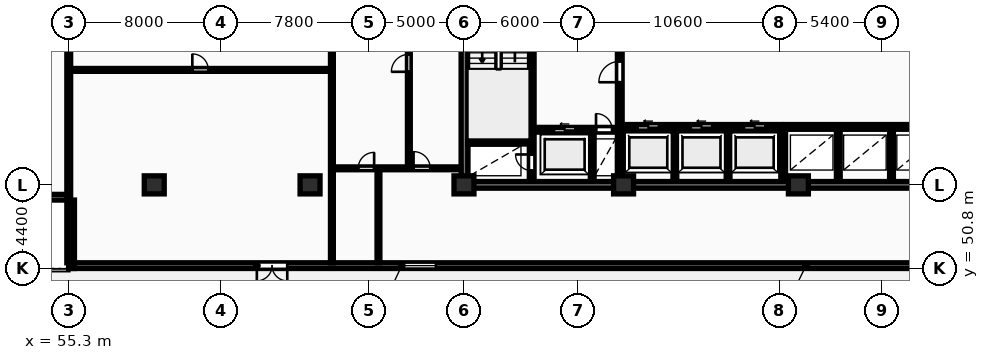
"""IFC4 building model, lengths in metres.
Left out: names, types, materials, properties, quantities, classifications, styles, units other than length and angle.
Written with IfcOpenShell. Run it as: python <this file> out.ifc"""

import sys

from ifc_helpers import new_model, si_unit, direction, frame, frame_2d, origin, origin_2d, place, context, subcontext, project, spatial, rectangle, extrude, element, fill, save


model = new_model("IFC4")
c1 = context("Model", 3, precision=1e-05, world=origin(), true_north=direction((0.0, 1.0)))
c2 = subcontext(c1, "Body", "Model", "MODEL_VIEW")
j1 = project(units=[si_unit("LENGTHUNIT", "METRE"), si_unit("PLANEANGLEUNIT", "RADIAN")], contexts=[c1])
p1 = place(None, origin())
s1 = spatial("IfcSite", under=j1, at=p1, CompositionType="ELEMENT")
p2 = place(p1, origin())
s2 = spatial("IfcBuilding", under=s1, at=p2, CompositionType="ELEMENT")
p3 = place(p2, frame((0.0, 0.0, 24.0)))
s3 = spatial("IfcBuildingStorey", under=s2, at=p3, CompositionType="ELEMENT", Elevation=24.0)
for number, where, z_axis, x_axis in (
    (1, (59.8, 55.2, 0.0), (0.0, 0.0, 1.0), (1.0, 0.0, 0.0)),
    (2, (68.0, 55.2, 0.0), (0.0, 0.0, 1.0), (1.0, 0.0, 0.0)),
    (3, (76.1, 55.2, 0.0), (0.0, 0.0, 1.0), (1.0, 0.0, 0.0)),
    (4, (84.5, 55.2, 0.0), (0.0, 0.0, 1.0), (1.0, 0.0, 0.0)),
    (5, (93.7, 55.2, 0.0), (0.0, 0.0, 1.0), (1.0, 0.0, 0.0)),
):
    element("IfcColumn", number, at=place(p3, frame(where, z_axis=z_axis, x_axis=x_axis)), inside=s3, PredefinedType="COLUMN", context=c2, shape_type="SweptSolid", body=[
        extrude(rectangle(XDim=1.05, YDim=0.95, at=origin_2d()), origin(), (0.0, 0.0, 1.0), 3.25),
    ])
p4 = place(p3, frame((55.3, 50.95, 0.0), z_axis=(0.0, 0.0, 1.0), x_axis=(1.0, 0.0, 0.0)))
e6 = element("IfcWall", 6, at=p4, inside=s3, PredefinedType="STANDARD", context=c2, shape_type="SweptSolid", body=[
    extrude(rectangle(XDim=77.6, YDim=0.3, at=frame_2d((38.8, 0.0))), origin(), (0.0, 0.0, 1.0), 2.97),
])
p5 = place(p4, frame((17.525, 0.0, 0.85)))
e7 = element("IfcOpeningElement", 7, at=p5, cuts=e6, PredefinedType="OPENING", context=c2, shape_type="SweptSolid", body=[
    extrude(rectangle(XDim=1.8, YDim=1.8, at=frame_2d((0.9, 0.9))), frame((0.0, 0.16, 0.0), z_axis=(0.0, -1.0, 0.0), x_axis=(1.0, 0.0, 0.0)), (0.0, 0.0, 1.0), 0.32),
])
p6 = place(p4, frame((60.875, 0.0, 0.85)))
e8 = element("IfcOpeningElement", 8, at=p6, cuts=e6, PredefinedType="OPENING", context=c2, shape_type="SweptSolid", body=[
    extrude(rectangle(XDim=1.8, YDim=1.8, at=frame_2d((0.9, 0.9))), frame((0.0, 0.16, 0.0), z_axis=(0.0, -1.0, 0.0), x_axis=(1.0, 0.0, 0.0)), (0.0, 0.0, 1.0), 0.32),
])
p7 = place(p4, frame((9.9, 0.0, 0.0)))
e9 = element("IfcOpeningElement", 9, at=p7, cuts=e6, PredefinedType="OPENING", context=c2, shape_type="SweptSolid", body=[
    extrude(rectangle(XDim=1.6, YDim=2.2, at=frame_2d((0.8, 1.1))), frame((0.0, 0.16, 0.0), z_axis=(0.0, -1.0, 0.0), x_axis=(1.0, 0.0, 0.0)), (0.0, 0.0, 1.0), 0.32),
])
p8 = place(p3, frame((51.7, 54.55, 0.0), z_axis=(0.0, 0.0, 1.0), x_axis=(1.0, 0.0, 0.0)))
e10 = element("IfcWall", 10, at=p8, inside=s3, PredefinedType="STANDARD", context=c2, shape_type="SweptSolid", body=[
    extrude(rectangle(XDim=3.6, YDim=0.3, at=frame_2d((1.8, 0.0))), origin(), (0.0, 0.0, 1.0), 2.97),
])
p9 = place(p3, frame((55.45, 54.4, 0.0), z_axis=(0.0, 0.0, 1.0), x_axis=(0.0, -1.0, 0.0)))
e11 = element("IfcWall", 11, at=p9, inside=s3, PredefinedType="STANDARD", context=c2, shape_type="SweptSolid", body=[
    extrude(rectangle(XDim=3.6, YDim=0.3, at=frame_2d((1.8, 0.0))), origin(), (0.0, 0.0, 1.0), 2.97),
])
p10 = place(p3, frame((75.95, 55.2, 0.0), z_axis=(0.0, 0.0, 1.0), x_axis=(1.0, 0.0, 0.0)))
e12 = element("IfcWall", 12, at=p10, inside=s3, PredefinedType="SHEAR", context=c2, shape_type="SweptSolid", body=[
    extrude(rectangle(XDim=36.3, YDim=0.35, at=frame_2d((18.15, 0.0))), origin(), (0.0, 0.0, 1.0), 3.25),
])
p11 = place(p3, frame((76.125, 55.375, 0.0), z_axis=(0.0, 0.0, 1.0), x_axis=(0.0, 1.0, 0.0)))
e13 = element("IfcWall", 13, at=p11, inside=s3, PredefinedType="SHEAR", context=c2, shape_type="SweptSolid", body=[
    extrude(rectangle(XDim=11.65, YDim=0.35, at=frame_2d((5.825, 0.0))), origin(), (0.0, 0.0, 1.0), 3.25),
])
p12 = place(p3, frame((79.665, 55.4, 0.0), z_axis=(0.0, 0.0, 1.0), x_axis=(0.0, 1.0, 0.0)))
e14 = element("IfcWall", 14, at=p12, inside=s3, PredefinedType="SHEAR", context=c2, shape_type="SweptSolid", body=[
    extrude(rectangle(XDim=11.6, YDim=0.25, at=frame_2d((5.8, 0.0))), origin(), (0.0, 0.0, 1.0), 3.25),
])
p13 = place(p12, frame((0.55, 0.0, 0.0)))
e15 = element("IfcOpeningElement", 15, at=p13, cuts=e14, PredefinedType="OPENING", context=c2, shape_type="SweptSolid", body=[
    extrude(rectangle(XDim=0.85, YDim=2.05, at=frame_2d((0.425, 1.025))), frame((0.0, 0.135, 0.0), z_axis=(0.0, -1.0, 0.0), x_axis=(1.0, 0.0, 0.0)), (0.0, 0.0, 1.0), 0.27),
])
p14 = place(p12, frame((8.4, 0.0, 0.0)))
e16 = element("IfcOpeningElement", 16, at=p14, cuts=e14, PredefinedType="OPENING", context=c2, shape_type="SweptSolid", body=[
    extrude(rectangle(XDim=1.1, YDim=2.1, at=frame_2d((0.55, 1.05))), frame((0.0, 0.135, 0.0), z_axis=(0.0, -1.0, 0.0), x_axis=(1.0, 0.0, 0.0)), (0.0, 0.0, 1.0), 0.27),
])
p15 = place(p12, frame((10.25, 0.0, 0.0)))
e17 = element("IfcOpeningElement", 17, at=p15, cuts=e14, PredefinedType="OPENING", context=c2, shape_type="SweptSolid", body=[
    extrude(rectangle(XDim=0.85, YDim=2.05, at=frame_2d((0.425, 1.025))), frame((0.0, 0.135, 0.0), z_axis=(0.0, -1.0, 0.0), x_axis=(1.0, 0.0, 0.0)), (0.0, 0.0, 1.0), 0.27),
])
p16 = place(p3, frame((76.3, 57.475, 0.0), z_axis=(0.0, 0.0, 1.0), x_axis=(1.0, 0.0, 0.0)))
e18 = element("IfcWall", 18, at=p16, inside=s3, PredefinedType="SHEAR", context=c2, shape_type="SweptSolid", body=[
    extrude(rectangle(XDim=3.24, YDim=0.25, at=frame_2d((1.62, 0.0))), origin(), (0.0, 0.0, 1.0), 3.25),
])
p17 = place(p3, frame((79.79, 58.1, 0.0), z_axis=(0.0, 0.0, 1.0), x_axis=(1.0, 0.0, 0.0)))
e19 = element("IfcWall", 19, at=p17, inside=s3, PredefinedType="SHEAR", context=c2, shape_type="SweptSolid", body=[
    extrude(rectangle(XDim=4.39, YDim=0.25, at=frame_2d((2.195, 0.0))), origin(), (0.0, 0.0, 1.0), 3.25),
])
p18 = place(p17, frame((1.05, 0.0, 0.0)))
e20 = element("IfcOpeningElement", 20, at=p18, cuts=e19, PredefinedType="OPENING", context=c2, shape_type="SweptSolid", body=[
    extrude(rectangle(XDim=1.12, YDim=2.12, at=frame_2d((0.56, 1.06))), frame((0.0, 0.135, 0.0), z_axis=(0.0, -1.0, 0.0), x_axis=(1.0, 0.0, 0.0)), (0.0, 0.0, 1.0), 0.27),
])
p19 = place(p17, frame((3.26, 0.0, 0.0)))
e21 = element("IfcOpeningElement", 21, at=p19, cuts=e19, PredefinedType="OPENING", context=c2, shape_type="SweptSolid", body=[
    extrude(rectangle(XDim=0.85, YDim=2.05, at=frame_2d((0.425, 1.025))), frame((0.0, 0.135, 0.0), z_axis=(0.0, -1.0, 0.0), x_axis=(1.0, 0.0, 0.0)), (0.0, 0.0, 1.0), 0.27),
])
p20 = place(p3, frame((82.85, 55.4, 0.0), z_axis=(0.0, 0.0, 1.0), x_axis=(0.0, 1.0, 0.0)))
e22 = element("IfcWall", 22, at=p20, inside=s3, PredefinedType="PARTITIONING", context=c2, shape_type="SweptSolid", body=[
    extrude(rectangle(XDim=2.56, YDim=0.2, at=frame_2d((1.28, 0.0))), origin(), (0.0, 0.0, 1.0), 2.97),
])
p21 = place(p3, frame((84.3, 55.4, 0.0), z_axis=(0.0, 0.0, 1.0), x_axis=(0.0, 1.0, 0.0)))
e23 = element("IfcWall", 23, at=p21, inside=s3, PredefinedType="SHEAR", context=c2, shape_type="SweptSolid", body=[
    extrude(rectangle(XDim=11.6, YDim=0.25, at=frame_2d((5.8, 0.0))), origin(), (0.0, 0.0, 1.0), 3.25),
])
p22 = place(p21, frame((5.2, 0.0, 0.0)))
e24 = element("IfcOpeningElement", 24, at=p22, cuts=e23, PredefinedType="OPENING", context=c2, shape_type="SweptSolid", body=[
    extrude(rectangle(XDim=1.1, YDim=2.1, at=frame_2d((0.55, 1.05))), frame((0.0, 0.135, 0.0), z_axis=(0.0, -1.0, 0.0), x_axis=(1.0, 0.0, 0.0)), (0.0, 0.0, 1.0), 0.27),
])
for number, where, z_axis, x_axis in (
    (25, (87.2, 55.4, 0.0), (0.0, 0.0, 1.0), (0.0, 1.0, 0.0)),
    (26, (90.0, 55.4, 0.0), (0.0, 0.0, 1.0), (0.0, 1.0, 0.0)),
):
    element("IfcWall", number, at=place(p3, frame(where, z_axis=z_axis, x_axis=x_axis)), inside=s3, PredefinedType="PARTITIONING", context=c2, shape_type="SweptSolid", body=[
        extrude(rectangle(XDim=2.72, YDim=0.2, at=frame_2d((1.36, 0.0))), origin(), (0.0, 0.0, 1.0), 2.97),
    ])
p23 = place(p3, frame((84.42, 58.25, 0.0), z_axis=(0.0, 0.0, 1.0), x_axis=(1.0, 0.0, 0.0)))
e27 = element("IfcWall", 27, at=p23, inside=s3, PredefinedType="SHEAR", context=c2, shape_type="SweptSolid", body=[
    extrude(rectangle(XDim=8.36, YDim=0.25, at=frame_2d((4.18, 0.0))), origin(), (0.0, 0.0, 1.0), 3.25),
])
p24 = place(p23, frame((0.82, 0.0, 0.0)))
e28 = element("IfcOpeningElement", 28, at=p24, cuts=e27, PredefinedType="OPENING", context=c2, shape_type="SweptSolid", body=[
    extrude(rectangle(XDim=1.12, YDim=2.12, at=frame_2d((0.56, 1.06))), frame((0.0, 0.135, 0.0), z_axis=(0.0, -1.0, 0.0), x_axis=(1.0, 0.0, 0.0)), (0.0, 0.0, 1.0), 0.27),
])
p25 = place(p23, frame((3.62, 0.0, 0.0)))
e29 = element("IfcOpeningElement", 29, at=p25, cuts=e27, PredefinedType="OPENING", context=c2, shape_type="SweptSolid", body=[
    extrude(rectangle(XDim=1.12, YDim=2.12, at=frame_2d((0.56, 1.06))), frame((0.0, 0.135, 0.0), z_axis=(0.0, -1.0, 0.0), x_axis=(1.0, 0.0, 0.0)), (0.0, 0.0, 1.0), 0.27),
])
p26 = place(p23, frame((6.42, 0.0, 0.0)))
e30 = element("IfcOpeningElement", 30, at=p26, cuts=e27, PredefinedType="OPENING", context=c2, shape_type="SweptSolid", body=[
    extrude(rectangle(XDim=1.12, YDim=2.12, at=frame_2d((0.56, 1.06))), frame((0.0, 0.135, 0.0), z_axis=(0.0, -1.0, 0.0), x_axis=(1.0, 0.0, 0.0)), (0.0, 0.0, 1.0), 0.27),
])
p27 = place(p3, frame((92.9, 55.4, 0.0), z_axis=(0.0, 0.0, 1.0), x_axis=(0.0, 1.0, 0.0)))
e31 = element("IfcWall", 31, at=p27, inside=s3, PredefinedType="SHEAR", context=c2, shape_type="SweptSolid", body=[
    extrude(rectangle(XDim=2.85, YDim=0.25, at=frame_2d((1.425, 0.0))), origin(), (0.0, 0.0, 1.0), 3.25),
])
for number, where, z_axis, x_axis in (
    (32, (95.8, 55.4, 0.0), (0.0, 0.0, 1.0), (0.0, 1.0, 0.0)),
    (33, (98.6, 55.4, 0.0), (0.0, 0.0, 1.0), (0.0, 1.0, 0.0)),
):
    element("IfcWall", number, at=place(p3, frame(where, z_axis=z_axis, x_axis=x_axis)), inside=s3, PredefinedType="PARTITIONING", context=c2, shape_type="SweptSolid", body=[
        extrude(rectangle(XDim=2.72, YDim=0.2, at=frame_2d((1.36, 0.0))), origin(), (0.0, 0.0, 1.0), 2.97),
    ])
p28 = place(p3, frame((93.02, 58.25, 0.0), z_axis=(0.0, 0.0, 1.0), x_axis=(1.0, 0.0, 0.0)))
e34 = element("IfcWall", 34, at=p28, inside=s3, PredefinedType="SHEAR", context=c2, shape_type="SweptSolid", body=[
    extrude(rectangle(XDim=8.36, YDim=0.25, at=frame_2d((4.18, 0.0))), origin(), (0.0, 0.0, 1.0), 3.25),
])
p29 = place(p3, frame((55.3, 51.1, 0.0), z_axis=(0.0, 0.0, 1.0), x_axis=(0.0, 1.0, 0.0)))
e35 = element("IfcWall", 35, at=p29, inside=s3, PredefinedType="PARTITIONING", context=c2, shape_type="SweptSolid", body=[
    extrude(rectangle(XDim=16.1, YDim=0.2, at=frame_2d((8.05, 0.0))), origin(), (0.0, 0.0, 1.0), 2.97),
])
p30 = place(p3, frame((55.3, 61.25, 0.0), z_axis=(0.0, 0.0, 1.0), x_axis=(1.0, 0.0, 0.0)))
e36 = element("IfcWall", 36, at=p30, inside=s3, PredefinedType="PARTITIONING", context=c2, shape_type="SweptSolid", body=[
    extrude(rectangle(XDim=13.85, YDim=0.15, at=frame_2d((6.925, 0.0))), origin(), (0.0, 0.0, 1.0), 2.97),
])
p31 = place(p30, frame((6.505, 0.0, 0.0)))
e37 = element("IfcOpeningElement", 37, at=p31, cuts=e36, PredefinedType="OPENING", context=c2, shape_type="SweptSolid", body=[
    extrude(rectangle(XDim=0.84, YDim=2.04, at=frame_2d((0.42, 1.02))), frame((0.0, 0.085, 0.0), z_axis=(0.0, -1.0, 0.0), x_axis=(1.0, 0.0, 0.0)), (0.0, 0.0, 1.0), 0.17),
])
p32 = place(p3, frame((69.15, 51.1, 0.0), z_axis=(0.0, 0.0, 1.0), x_axis=(0.0, 1.0, 0.0)))
e38 = element("IfcWall", 38, at=p32, inside=s3, PredefinedType="PARTITIONING", context=c2, shape_type="SweptSolid", body=[
    extrude(rectangle(XDim=16.05, YDim=0.15, at=frame_2d((8.025, 0.0))), origin(), (0.0, 0.0, 1.0), 2.97),
])
p33 = place(p32, frame((11.3, 0.0, 0.0)))
e39 = element("IfcOpeningElement", 39, at=p33, cuts=e38, PredefinedType="OPENING", context=c2, shape_type="SweptSolid", body=[
    extrude(rectangle(XDim=0.88, YDim=2.06, at=frame_2d((0.44, 1.03))), frame((0.0, 0.085, 0.0), z_axis=(0.0, -1.0, 0.0), x_axis=(1.0, 0.0, 0.0)), (0.0, 0.0, 1.0), 0.17),
])
p34 = place(p3, frame((73.2, 56.07, 0.0), z_axis=(0.0, 0.0, 1.0), x_axis=(0.0, 1.0, 0.0)))
e40 = element("IfcWall", 40, at=p34, inside=s3, PredefinedType="PARTITIONING", context=c2, shape_type="SweptSolid", body=[
    extrude(rectangle(XDim=11.08, YDim=0.15, at=frame_2d((5.54, 0.0))), origin(), (0.0, 0.0, 1.0), 2.97),
])
p35 = place(p34, frame((5.08, 0.0, 0.0)))
e41 = element("IfcOpeningElement", 41, at=p35, cuts=e40, PredefinedType="OPENING", context=c2, shape_type="SweptSolid", body=[
    extrude(rectangle(XDim=0.92, YDim=2.08, at=frame_2d((0.46, 1.04))), frame((0.0, 0.085, 0.0), z_axis=(0.0, -1.0, 0.0), x_axis=(1.0, 0.0, 0.0)), (0.0, 0.0, 1.0), 0.17),
])
p36 = place(p3, frame((71.6, 51.1, 0.0), z_axis=(0.0, 0.0, 1.0), x_axis=(0.0, 1.0, 0.0)))
e42 = element("IfcWall", 42, at=p36, inside=s3, PredefinedType="PARTITIONING", context=c2, shape_type="SweptSolid", body=[
    extrude(rectangle(XDim=4.97, YDim=0.15, at=frame_2d((2.485, 0.0))), origin(), (0.0, 0.0, 1.0), 2.97),
])
p37 = place(p3, frame((69.17, 56.07, 0.0), z_axis=(0.0, 0.0, 1.0), x_axis=(1.0, 0.0, 0.0)))
e43 = element("IfcWall", 43, at=p37, inside=s3, PredefinedType="PARTITIONING", context=c2, shape_type="SweptSolid", body=[
    extrude(rectangle(XDim=6.76, YDim=0.15, at=frame_2d((3.38, 0.0))), origin(), (0.0, 0.0, 1.0), 2.97),
])
p38 = place(p37, frame((1.362, 0.0, 0.0)))
e44 = element("IfcOpeningElement", 44, at=p38, cuts=e43, PredefinedType="OPENING", context=c2, shape_type="SweptSolid", body=[
    extrude(rectangle(XDim=0.84, YDim=2.04, at=frame_2d((0.42, 1.02))), frame((0.0, 0.085, 0.0), z_axis=(0.0, -1.0, 0.0), x_axis=(1.0, 0.0, 0.0)), (0.0, 0.0, 1.0), 0.17),
])
p39 = place(p37, frame((4.277, 0.0, 0.0)))
e45 = element("IfcOpeningElement", 45, at=p39, cuts=e43, PredefinedType="OPENING", context=c2, shape_type="SweptSolid", body=[
    extrude(rectangle(XDim=0.88, YDim=2.06, at=frame_2d((0.44, 1.03))), frame((0.0, 0.085, 0.0), z_axis=(0.0, -1.0, 0.0), x_axis=(1.0, 0.0, 0.0)), (0.0, 0.0, 1.0), 0.17),
])
p40 = place(p5, origin())
e46 = element("IfcWindow", 46, at=p40, inside=s3, PartitioningType="SINGLE_PANEL", PredefinedType="WINDOW", context=c2, shape_type="SweptSolid", body=[
    extrude(rectangle(XDim=1.8, YDim=1.8, at=frame_2d((0.9, 0.9))), frame((0.0, 0.03, 0.0), z_axis=(0.0, -1.0, 0.0), x_axis=(1.0, 0.0, 0.0)), (0.0, 0.0, 1.0), 0.06),
])
fill(e7, e46)
p41 = place(p7, frame((1.6, 0.0, 0.0), z_axis=(0.0, 0.0, 1.0), x_axis=(-1.0, 0.0, 0.0)))
e47 = element("IfcDoor", 47, at=p41, inside=s3, OperationType="DOUBLE_DOOR_SINGLE_SWING", PredefinedType="DOOR", context=c2, shape_type="SweptSolid", body=[
    extrude(rectangle(XDim=1.6, YDim=2.2, at=frame_2d((0.8, 1.1))), frame((0.0, 0.025, 0.0), z_axis=(0.0, -1.0, 0.0), x_axis=(1.0, 0.0, 0.0)), (0.0, 0.0, 1.0), 0.05),
])
fill(e9, e47)
p42 = place(p13, origin())
e48 = element("IfcDoor", 48, at=p42, inside=s3, OperationType="SINGLE_SWING_RIGHT", PredefinedType="DOOR", context=c2, shape_type="SweptSolid", body=[
    extrude(rectangle(XDim=0.85, YDim=2.05, at=frame_2d((0.425, 1.025))), frame((0.0, 0.025, 0.0), z_axis=(0.0, -1.0, 0.0), x_axis=(1.0, 0.0, 0.0)), (0.0, 0.0, 1.0), 0.05),
])
fill(e15, e48)
p43 = place(p18, origin())
e49 = element("IfcDoor", 49, at=p43, inside=s3, OperationType="SLIDING_TO_LEFT", PredefinedType="DOOR", context=c2, shape_type="SweptSolid", body=[
    extrude(rectangle(XDim=1.12, YDim=2.12, at=frame_2d((0.56, 1.06))), frame((0.0, 0.025, 0.0), z_axis=(0.0, -1.0, 0.0), x_axis=(1.0, 0.0, 0.0)), (0.0, 0.0, 1.0), 0.05),
])
fill(e20, e49)
p44 = place(p19, origin())
e50 = element("IfcDoor", 50, at=p44, inside=s3, OperationType="SINGLE_SWING_LEFT", PredefinedType="DOOR", context=c2, shape_type="SweptSolid", body=[
    extrude(rectangle(XDim=0.85, YDim=2.05, at=frame_2d((0.425, 1.025))), frame((0.0, 0.025, 0.0), z_axis=(0.0, -1.0, 0.0), x_axis=(1.0, 0.0, 0.0)), (0.0, 0.0, 1.0), 0.05),
])
fill(e21, e50)
p45 = place(p22, origin())
e51 = element("IfcDoor", 51, at=p45, inside=s3, OperationType="SINGLE_SWING_LEFT", PredefinedType="DOOR", context=c2, shape_type="SweptSolid", body=[
    extrude(rectangle(XDim=1.1, YDim=2.1, at=frame_2d((0.55, 1.05))), frame((0.0, 0.025, 0.0), z_axis=(0.0, -1.0, 0.0), x_axis=(1.0, 0.0, 0.0)), (0.0, 0.0, 1.0), 0.05),
])
fill(e24, e51)
p46 = place(p24, origin())
e52 = element("IfcDoor", 52, at=p46, inside=s3, OperationType="SLIDING_TO_LEFT", PredefinedType="DOOR", context=c2, shape_type="SweptSolid", body=[
    extrude(rectangle(XDim=1.12, YDim=2.12, at=frame_2d((0.56, 1.06))), frame((0.0, 0.025, 0.0), z_axis=(0.0, -1.0, 0.0), x_axis=(1.0, 0.0, 0.0)), (0.0, 0.0, 1.0), 0.05),
])
fill(e28, e52)
p47 = place(p25, origin())
e53 = element("IfcDoor", 53, at=p47, inside=s3, OperationType="SLIDING_TO_LEFT", PredefinedType="DOOR", context=c2, shape_type="SweptSolid", body=[
    extrude(rectangle(XDim=1.12, YDim=2.12, at=frame_2d((0.56, 1.06))), frame((0.0, 0.025, 0.0), z_axis=(0.0, -1.0, 0.0), x_axis=(1.0, 0.0, 0.0)), (0.0, 0.0, 1.0), 0.05),
])
fill(e29, e53)
p48 = place(p26, origin())
e54 = element("IfcDoor", 54, at=p48, inside=s3, OperationType="SLIDING_TO_LEFT", PredefinedType="DOOR", context=c2, shape_type="SweptSolid", body=[
    extrude(rectangle(XDim=1.12, YDim=2.12, at=frame_2d((0.56, 1.06))), frame((0.0, 0.025, 0.0), z_axis=(0.0, -1.0, 0.0), x_axis=(1.0, 0.0, 0.0)), (0.0, 0.0, 1.0), 0.05),
])
fill(e30, e54)
p49 = place(p31, origin())
e55 = element("IfcDoor", 55, at=p49, inside=s3, OperationType="SINGLE_SWING_LEFT", PredefinedType="DOOR", context=c2, shape_type="SweptSolid", body=[
    extrude(rectangle(XDim=0.84, YDim=2.04, at=frame_2d((0.42, 1.02))), frame((0.0, 0.025, 0.0), z_axis=(0.0, -1.0, 0.0), x_axis=(1.0, 0.0, 0.0)), (0.0, 0.0, 1.0), 0.05),
])
fill(e37, e55)
p50 = place(p35, origin())
e56 = element("IfcDoor", 56, at=p50, inside=s3, OperationType="SINGLE_SWING_LEFT", PredefinedType="DOOR", context=c2, shape_type="SweptSolid", body=[
    extrude(rectangle(XDim=0.92, YDim=2.08, at=frame_2d((0.46, 1.04))), frame((0.0, 0.025, 0.0), z_axis=(0.0, -1.0, 0.0), x_axis=(1.0, 0.0, 0.0)), (0.0, 0.0, 1.0), 0.05),
])
fill(e41, e56)
p51 = place(p38, origin())
e57 = element("IfcDoor", 57, at=p51, inside=s3, OperationType="SINGLE_SWING_RIGHT", PredefinedType="DOOR", context=c2, shape_type="SweptSolid", body=[
    extrude(rectangle(XDim=0.84, YDim=2.04, at=frame_2d((0.42, 1.02))), frame((0.0, 0.025, 0.0), z_axis=(0.0, -1.0, 0.0), x_axis=(1.0, 0.0, 0.0)), (0.0, 0.0, 1.0), 0.05),
])
fill(e44, e57)
p52 = place(p39, origin())
e58 = element("IfcDoor", 58, at=p52, inside=s3, OperationType="SINGLE_SWING_LEFT", PredefinedType="DOOR", context=c2, shape_type="SweptSolid", body=[
    extrude(rectangle(XDim=0.88, YDim=2.06, at=frame_2d((0.44, 1.03))), frame((0.0, 0.025, 0.0), z_axis=(0.0, -1.0, 0.0), x_axis=(1.0, 0.0, 0.0)), (0.0, 0.0, 1.0), 0.05),
])
fill(e45, e58)
save(model, sys.argv[1])
